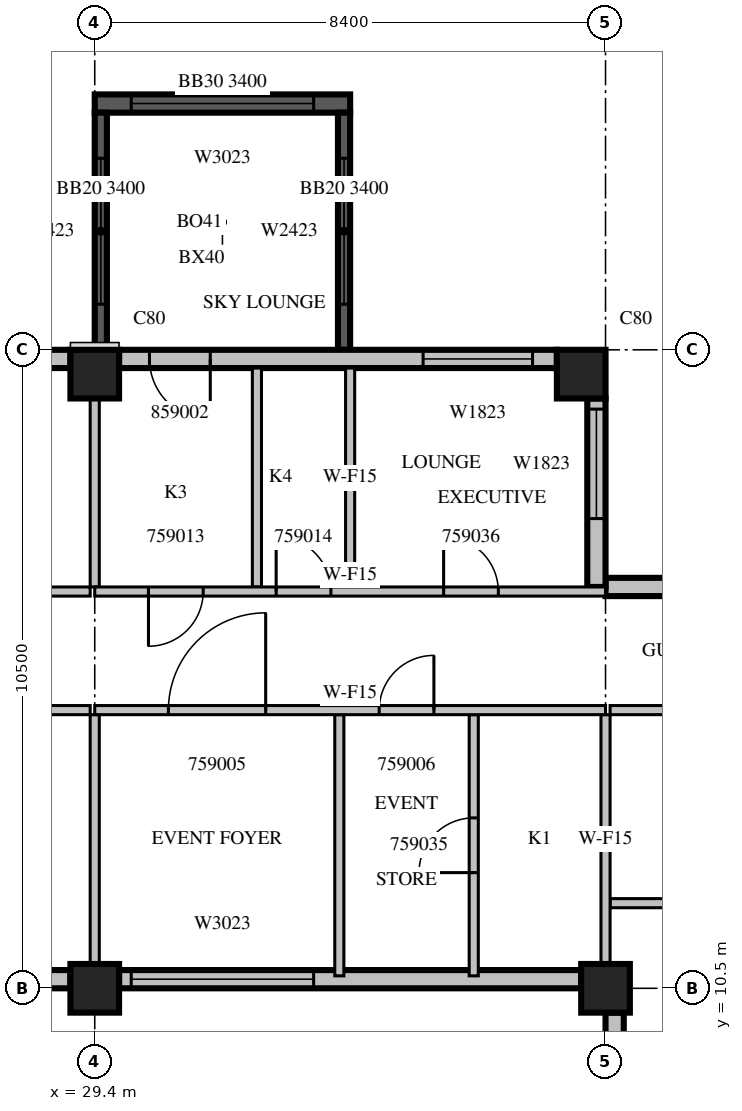
"""IFC4 building model, lengths in metres.
Left out: names, types, materials, properties, quantities, classifications, styles, units other than length and angle.
Written with IfcOpenShell. Run it as: python <this file> out.ifc"""

import sys

from ifc_helpers import new_model, si_unit, direction, frame, frame_2d, origin, origin_2d, place, context, subcontext, project, spatial, rectangle, extrude, source, transform, mapped, element, fill, save


model = new_model("IFC4")
c1 = context("Model", 3, precision=1e-05, world=origin(), true_north=direction((0.0, 1.0)))
c2 = subcontext(c1, "Body", "Model", "MODEL_VIEW")
j1 = project(units=[si_unit("LENGTHUNIT", "METRE"), si_unit("PLANEANGLEUNIT", "RADIAN")], contexts=[c1])
p1 = place(None, origin())
s1 = spatial("IfcSite", under=j1, at=p1, CompositionType="ELEMENT")
p2 = place(p1, origin())
s2 = spatial("IfcBuilding", under=s1, at=p2, CompositionType="ELEMENT")
p3 = place(p2, frame((0.0, 0.0, 257.6)))
s3 = spatial("IfcBuildingStorey", under=s2, at=p3, CompositionType="ELEMENT", Elevation=257.6)
m1 = source(origin(), c2, "Body", "SweptSolid", [
    extrude(rectangle(XDim=0.8, YDim=0.8, at=origin_2d()), origin(), (0.0, 0.0, 1.0), 3.8),
])
for number, where, z_axis, x_axis in (
    (1, (29.4, 10.5, 0.0), (0.0, 0.0, 1.0), (1.0, 0.0, 0.0)),
    (2, (37.8, 10.5, 0.0), (0.0, 0.0, 1.0), (1.0, 0.0, 0.0)),
    (3, (29.4, 20.6, 0.0), (0.0, 0.0, 1.0), (1.0, 0.0, 0.0)),
    (4, (37.4, 20.6, 0.0), (0.0, 0.0, 1.0), (1.0, 0.0, 0.0)),
):
    element("IfcColumn", number, at=place(p3, frame(where, z_axis=z_axis, x_axis=x_axis)), inside=s3, PredefinedType="COLUMN", context=c2, shape_type="MappedRepresentation", body=[
        mapped(m1, transform((0.0, 0.0, 0.0), scale=1.0)),
    ])
m2 = source(origin(), c2, "Body", "SweptSolid", [
    extrude(rectangle(XDim=4.2, YDim=0.3, at=frame_2d((2.1, 0.0))), origin(), (0.0, 0.0, 1.0), 3.4),
])
p4 = place(p3, frame((33.6, 25.05, 0.0), z_axis=(0.0, 0.0, 1.0), x_axis=(-1.0, 0.0, 0.0)))
e5 = element("IfcWall", 5, at=p4, inside=s3, PredefinedType="SOLIDWALL", context=c2, shape_type="MappedRepresentation", body=[
    mapped(m2, transform((0.0, 0.0, 0.0), scale=1.0)),
])
m3 = source(origin(), c2, "Body", "SweptSolid", [
    extrude(rectangle(XDim=3.0, YDim=2.3, at=frame_2d((1.5, 1.15))), frame((0.0, 0.16, 0.0), z_axis=(0.0, -1.0, 0.0), x_axis=(1.0, 0.0, 0.0)), (0.0, 0.0, 1.0), 0.32),
])
p5 = place(p4, frame((0.6, 0.0, 0.6)))
e6 = element("IfcOpeningElement", 6, at=p5, cuts=e5, PredefinedType="OPENING", context=c2, shape_type="MappedRepresentation", body=[
    mapped(m3, transform((0.0, 0.0, 0.0), scale=1.0)),
])
m4 = source(origin(), c2, "Body", "SweptSolid", [
    extrude(rectangle(XDim=3.9, YDim=0.2, at=frame_2d((1.95, 0.0))), origin(), (0.0, 0.0, 1.0), 3.4),
])
p6 = place(p3, frame((33.5, 21.0, 0.0), z_axis=(0.0, 0.0, 1.0), x_axis=(0.0, 1.0, 0.0)))
e7 = element("IfcWall", 7, at=p6, inside=s3, PredefinedType="SOLIDWALL", context=c2, shape_type="MappedRepresentation", body=[
    mapped(m4, transform((0.0, 0.0, 0.0), scale=1.0)),
])
m5 = source(origin(), c2, "Body", "SweptSolid", [
    extrude(rectangle(XDim=2.4, YDim=2.3, at=frame_2d((1.2, 1.15))), frame((0.0, 0.11, 0.0), z_axis=(0.0, -1.0, 0.0), x_axis=(1.0, 0.0, 0.0)), (0.0, 0.0, 1.0), 0.22),
])
p7 = place(p6, frame((0.75, 0.0, 0.6)))
e8 = element("IfcOpeningElement", 8, at=p7, cuts=e7, PredefinedType="OPENING", context=c2, shape_type="MappedRepresentation", body=[
    mapped(m5, transform((0.0, 0.0, 0.0), scale=1.0)),
])
p8 = place(p3, frame((29.5, 21.0, 0.0), z_axis=(0.0, 0.0, 1.0), x_axis=(0.0, 1.0, 0.0)))
e9 = element("IfcWall", 9, at=p8, inside=s3, PredefinedType="SOLIDWALL", context=c2, shape_type="MappedRepresentation", body=[
    mapped(m4, transform((0.0, 0.0, 0.0), scale=1.0)),
])
p9 = place(p8, frame((0.75, 0.0, 0.6)))
e10 = element("IfcOpeningElement", 10, at=p9, cuts=e9, PredefinedType="OPENING", context=c2, shape_type="MappedRepresentation", body=[
    mapped(m5, transform((0.0, 0.0, 0.0), scale=1.0)),
])
m6 = source(origin(), c2, "Body", "SweptSolid", [
    extrude(rectangle(XDim=7.2, YDim=0.3, at=frame_2d((3.6, 0.0))), origin(), (0.0, 0.0, 1.0), 3.4),
])
p10 = place(p3, frame((21.8, 10.65, 0.0), z_axis=(0.0, 0.0, 1.0), x_axis=(1.0, 0.0, 0.0)))
e11 = element("IfcWall", 11, at=p10, inside=s3, PredefinedType="STANDARD", context=c2, shape_type="MappedRepresentation", body=[
    mapped(m6, transform((0.0, 0.0, 0.0), scale=1.0)),
])
m7 = source(origin(), c2, "Body", "SweptSolid", [
    extrude(rectangle(XDim=1.8, YDim=2.3, at=frame_2d((0.9, 1.15))), frame((0.0, 0.16, 0.0), z_axis=(0.0, -1.0, 0.0), x_axis=(1.0, 0.0, 0.0)), (0.0, 0.0, 1.0), 0.32),
])
p11 = place(p10, frame((0.4, 0.0, 0.6)))
e12 = element("IfcOpeningElement", 12, at=p11, cuts=e11, PredefinedType="OPENING", context=c2, shape_type="MappedRepresentation", body=[
    mapped(m7, transform((0.0, 0.0, 0.0), scale=1.0)),
])
p12 = place(p10, frame((4.787, 0.0, 0.6)))
e13 = element("IfcOpeningElement", 13, at=p12, cuts=e11, PredefinedType="OPENING", context=c2, shape_type="MappedRepresentation", body=[
    mapped(m7, transform((0.0, 0.0, 0.0), scale=1.0)),
])
m8 = source(origin(), c2, "Body", "SweptSolid", [
    extrude(rectangle(XDim=7.6, YDim=0.3, at=frame_2d((3.8, 0.0))), origin(), (0.0, 0.0, 1.0), 3.4),
])
p13 = place(p3, frame((29.8, 10.65, 0.0), z_axis=(0.0, 0.0, 1.0), x_axis=(1.0, 0.0, 0.0)))
e14 = element("IfcWall", 14, at=p13, inside=s3, PredefinedType="STANDARD", context=c2, shape_type="MappedRepresentation", body=[
    mapped(m8, transform((0.0, 0.0, 0.0), scale=1.0)),
])
p14 = place(p13, frame((0.2, 0.0, 0.6)))
e15 = element("IfcOpeningElement", 15, at=p14, cuts=e14, PredefinedType="OPENING", context=c2, shape_type="MappedRepresentation", body=[
    mapped(m3, transform((0.0, 0.0, 0.0), scale=1.0)),
])
m9 = source(origin(), c2, "Body", "SweptSolid", [
    extrude(rectangle(XDim=9.3, YDim=0.3, at=frame_2d((4.65, 0.0))), origin(), (0.0, 0.0, 1.0), 3.4),
])
p15 = place(p3, frame((37.95, 10.1, 0.0), z_axis=(0.0, 0.0, 1.0), x_axis=(0.0, -1.0, 0.0)))
e16 = element("IfcWall", 16, at=p15, inside=s3, PredefinedType="STANDARD", context=c2, shape_type="MappedRepresentation", body=[
    mapped(m9, transform((0.0, 0.0, 0.0), scale=1.0)),
])
p16 = place(p15, frame((2.013, 0.0, 0.6)))
e17 = element("IfcOpeningElement", 17, at=p16, cuts=e16, PredefinedType="OPENING", context=c2, shape_type="MappedRepresentation", body=[
    mapped(m7, transform((0.0, 0.0, 0.0), scale=1.0)),
])
p17 = place(p15, frame((5.975, 0.0, 0.6)))
e18 = element("IfcOpeningElement", 18, at=p17, cuts=e16, PredefinedType="OPENING", context=c2, shape_type="MappedRepresentation", body=[
    mapped(m3, transform((0.0, 0.0, 0.0), scale=1.0)),
])
m10 = source(origin(), c2, "Body", "SweptSolid", [
    extrude(rectangle(XDim=15.96, YDim=0.3, at=frame_2d((7.98, 0.0))), origin(), (0.0, 0.0, 1.0), 3.4),
])
p18 = place(p3, frame((53.76, 17.1, 0.0), z_axis=(0.0, 0.0, 1.0), x_axis=(-1.0, 0.0, 0.0)))
e19 = element("IfcWall", 19, at=p18, inside=s3, PredefinedType="STANDARD", context=c2, shape_type="MappedRepresentation", body=[
    mapped(m10, transform((0.0, 0.0, 0.0), scale=1.0)),
])
p19 = place(p18, frame((0.6, 0.0, 0.6)))
e20 = element("IfcOpeningElement", 20, at=p19, cuts=e19, PredefinedType="OPENING", context=c2, shape_type="MappedRepresentation", body=[
    mapped(m3, transform((0.0, 0.0, 0.0), scale=1.0)),
])
p20 = place(p18, frame((4.8, 0.0, 0.6)))
e21 = element("IfcOpeningElement", 21, at=p20, cuts=e19, PredefinedType="OPENING", context=c2, shape_type="MappedRepresentation", body=[
    mapped(m3, transform((0.0, 0.0, 0.0), scale=1.0)),
])
m11 = source(origin(), c2, "Body", "SweptSolid", [
    extrude(rectangle(XDim=3.6, YDim=2.3, at=frame_2d((1.8, 1.15))), frame((0.0, 0.16, 0.0), z_axis=(0.0, -1.0, 0.0), x_axis=(1.0, 0.0, 0.0)), (0.0, 0.0, 1.0), 0.32),
])
p21 = place(p18, frame((9.54, 0.0, 0.6)))
e22 = element("IfcOpeningElement", 22, at=p21, cuts=e19, PredefinedType="OPENING", context=c2, shape_type="MappedRepresentation", body=[
    mapped(m11, transform((0.0, 0.0, 0.0), scale=1.0)),
])
m12 = source(origin(), c2, "Body", "SweptSolid", [
    extrude(rectangle(XDim=3.1, YDim=0.3, at=frame_2d((1.55, 0.0))), origin(), (0.0, 0.0, 1.0), 3.4),
])
p22 = place(p3, frame((37.65, 17.1, 0.0), z_axis=(0.0, 0.0, 1.0), x_axis=(0.0, 1.0, 0.0)))
e23 = element("IfcWall", 23, at=p22, inside=s3, PredefinedType="STANDARD", context=c2, shape_type="MappedRepresentation", body=[
    mapped(m12, transform((0.0, 0.0, 0.0), scale=1.0)),
])
p23 = place(p22, frame((1.125, 0.0, 0.6)))
e24 = element("IfcOpeningElement", 24, at=p23, cuts=e23, PredefinedType="OPENING", context=c2, shape_type="MappedRepresentation", body=[
    mapped(m7, transform((0.0, 0.0, 0.0), scale=1.0)),
])
p24 = place(p3, frame((37.0, 20.85, 0.0), z_axis=(0.0, 0.0, 1.0), x_axis=(-1.0, 0.0, 0.0)))
e25 = element("IfcWall", 25, at=p24, inside=s3, PredefinedType="STANDARD", context=c2, shape_type="MappedRepresentation", body=[
    mapped(m6, transform((0.0, 0.0, 0.0), scale=1.0)),
])
p25 = place(p24, frame((0.4, 0.0, 0.6)))
e26 = element("IfcOpeningElement", 26, at=p25, cuts=e25, PredefinedType="OPENING", context=c2, shape_type="MappedRepresentation", body=[
    mapped(m7, transform((0.0, 0.0, 0.0), scale=1.0)),
])
m13 = source(origin(), c2, "Body", "SweptSolid", [
    extrude(rectangle(XDim=1.0, YDim=2.1, at=frame_2d((0.5, 1.05))), frame((0.0, 0.16, 0.0), z_axis=(0.0, -1.0, 0.0), x_axis=(1.0, 0.0, 0.0)), (0.0, 0.0, 1.0), 0.32),
])
p26 = place(p24, frame((5.7, 0.0, 0.0)))
e27 = element("IfcOpeningElement", 27, at=p26, cuts=e25, PredefinedType="OPENING", context=c2, shape_type="MappedRepresentation", body=[
    mapped(m13, transform((0.0, 0.0, 0.0), scale=1.0)),
])
p27 = place(p3, frame((29.0, 20.85, 0.0), z_axis=(0.0, 0.0, 1.0), x_axis=(-1.0, 0.0, 0.0)))
e28 = element("IfcWall", 28, at=p27, inside=s3, PredefinedType="STANDARD", context=c2, shape_type="MappedRepresentation", body=[
    mapped(m6, transform((0.0, 0.0, 0.0), scale=1.0)),
])
p28 = place(p27, frame((0.613, 0.0, 0.6)))
e29 = element("IfcOpeningElement", 29, at=p28, cuts=e28, PredefinedType="OPENING", context=c2, shape_type="MappedRepresentation", body=[
    mapped(m7, transform((0.0, 0.0, 0.0), scale=1.0)),
])
p29 = place(p27, frame((5.0, 0.0, 0.6)))
e30 = element("IfcOpeningElement", 30, at=p29, cuts=e28, PredefinedType="OPENING", context=c2, shape_type="MappedRepresentation", body=[
    mapped(m7, transform((0.0, 0.0, 0.0), scale=1.0)),
])
m14 = source(origin(), c2, "Body", "SweptSolid", [
    extrude(rectangle(XDim=3.25, YDim=0.15, at=frame_2d((1.625, 0.0))), origin(), (0.0, 0.0, 1.0), 3.4),
])
for number, where, z_axis, x_axis in (
    (31, (29.325, 15.075, 0.0), (0.0, 0.0, 1.0), (-1.0, 0.0, 0.0)),
    (32, (26.075, 17.025, 0.0), (0.0, 0.0, 1.0), (1.0, 0.0, 0.0)),
):
    element("IfcWall", number, at=place(p3, frame(where, z_axis=z_axis, x_axis=x_axis)), inside=s3, PredefinedType="PARTITIONING", context=c2, shape_type="MappedRepresentation", body=[
        mapped(m14, transform((0.0, 0.0, 0.0), scale=1.0)),
    ])
m15 = source(origin(), c2, "Body", "SweptSolid", [
    extrude(rectangle(XDim=4.101, YDim=0.15, at=frame_2d((2.05, 0.0))), origin(), (0.0, 0.0, 1.0), 3.4),
])
p30 = place(p3, frame((29.4, 10.899, 0.0), z_axis=(0.0, 0.0, 1.0), x_axis=(0.0, 1.0, 0.0)))
e33 = element("IfcWall", 33, at=p30, inside=s3, PredefinedType="PARTITIONING", context=c2, shape_type="MappedRepresentation", body=[
    mapped(m15, transform((0.0, 0.0, 0.0), scale=1.0)),
])
m16 = source(origin(), c2, "Body", "SweptSolid", [
    extrude(rectangle(XDim=3.101, YDim=0.15, at=frame_2d((1.55, 0.0))), origin(), (0.0, 0.0, 1.0), 3.4),
])
p31 = place(p3, frame((29.4, 17.1, 0.0), z_axis=(0.0, 0.0, 1.0), x_axis=(0.0, 1.0, 0.0)))
e34 = element("IfcWall", 34, at=p31, inside=s3, PredefinedType="PARTITIONING", context=c2, shape_type="MappedRepresentation", body=[
    mapped(m16, transform((0.0, 0.0, 0.0), scale=1.0)),
])
m17 = source(origin(), c2, "Body", "SweptSolid", [
    extrude(rectangle(XDim=6.45, YDim=0.15, at=frame_2d((3.225, 0.0))), origin(), (0.0, 0.0, 1.0), 3.4),
])
p32 = place(p3, frame((37.875, 11.9, 0.0), z_axis=(0.0, 0.0, 1.0), x_axis=(1.0, 0.0, 0.0)))
e35 = element("IfcWall", 35, at=p32, inside=s3, PredefinedType="PARTITIONING", context=c2, shape_type="MappedRepresentation", body=[
    mapped(m17, transform((0.0, 0.0, 0.0), scale=1.0)),
])
p33 = place(p3, frame((44.325, 15.075, 0.0), z_axis=(0.0, 0.0, 1.0), x_axis=(-1.0, 0.0, 0.0)))
e36 = element("IfcWall", 36, at=p33, inside=s3, PredefinedType="PARTITIONING", context=c2, shape_type="MappedRepresentation", body=[
    mapped(m17, transform((0.0, 0.0, 0.0), scale=1.0)),
])
m18 = source(origin(), c2, "Body", "SweptSolid", [
    extrude(rectangle(XDim=0.9, YDim=2.1, at=frame_2d((0.45, 1.05))), frame((0.0, 0.085, 0.0), z_axis=(0.0, -1.0, 0.0), x_axis=(1.0, 0.0, 0.0)), (0.0, 0.0, 1.0), 0.17),
])
p34 = place(p33, frame((2.812, 0.0, 0.0)))
e37 = element("IfcOpeningElement", 37, at=p34, cuts=e36, PredefinedType="OPENING", context=c2, shape_type="MappedRepresentation", body=[
    mapped(m18, transform((0.0, 0.0, 0.0), scale=1.0)),
])
m19 = source(origin(), c2, "Body", "SweptSolid", [
    extrude(rectangle(XDim=4.295, YDim=0.15, at=frame_2d((2.147, 0.0))), origin(), (0.0, 0.0, 1.0), 3.4),
])
p35 = place(p3, frame((33.422, 10.705, 0.0), z_axis=(0.0, 0.0, 1.0), x_axis=(0.0, 1.0, 0.0)))
e38 = element("IfcWall", 38, at=p35, inside=s3, PredefinedType="PARTITIONING", context=c2, shape_type="MappedRepresentation", body=[
    mapped(m19, transform((0.0, 0.0, 0.0), scale=1.0)),
])
p36 = place(p3, frame((35.633, 10.705, 0.0), z_axis=(0.0, 0.0, 1.0), x_axis=(0.0, 1.0, 0.0)))
e39 = element("IfcWall", 39, at=p36, inside=s3, PredefinedType="PARTITIONING", context=c2, shape_type="MappedRepresentation", body=[
    mapped(m19, transform((0.0, 0.0, 0.0), scale=1.0)),
])
p37 = place(p36, frame((1.698, 0.0, 0.0)))
e40 = element("IfcOpeningElement", 40, at=p37, cuts=e39, PredefinedType="OPENING", context=c2, shape_type="MappedRepresentation", body=[
    mapped(m18, transform((0.0, 0.0, 0.0), scale=1.0)),
])
p38 = place(p3, frame((37.8, 10.899, 0.0), z_axis=(0.0, 0.0, 1.0), x_axis=(0.0, 1.0, 0.0)))
e41 = element("IfcWall", 41, at=p38, inside=s3, PredefinedType="PARTITIONING", context=c2, shape_type="MappedRepresentation", body=[
    mapped(m15, transform((0.0, 0.0, 0.0), scale=1.0)),
])
m20 = source(origin(), c2, "Body", "SweptSolid", [
    extrude(rectangle(XDim=3.6, YDim=0.15, at=frame_2d((1.8, 0.0))), origin(), (0.0, 0.0, 1.0), 3.4),
])
for number, where, z_axis, x_axis in (
    (42, (32.067, 20.7, 0.0), (0.0, 0.0, 1.0), (0.0, -1.0, 0.0)),
    (43, (33.6, 17.1, 0.0), (0.0, 0.0, 1.0), (0.0, 1.0, 0.0)),
):
    element("IfcWall", number, at=place(p3, frame(where, z_axis=z_axis, x_axis=x_axis)), inside=s3, PredefinedType="PARTITIONING", context=c2, shape_type="MappedRepresentation", body=[
        mapped(m20, transform((0.0, 0.0, 0.0), scale=1.0)),
    ])
m21 = source(origin(), c2, "Body", "SweptSolid", [
    extrude(rectangle(XDim=8.4, YDim=0.15, at=frame_2d((4.2, 0.0))), origin(), (0.0, 0.0, 1.0), 3.4),
])
p39 = place(p3, frame((37.8, 15.075, 0.0), z_axis=(0.0, 0.0, 1.0), x_axis=(-1.0, 0.0, 0.0)))
e44 = element("IfcWall", 44, at=p39, inside=s3, PredefinedType="PARTITIONING", context=c2, shape_type="MappedRepresentation", body=[
    mapped(m21, transform((0.0, 0.0, 0.0), scale=1.0)),
])
m22 = source(origin(), c2, "Body", "SweptSolid", [
    extrude(rectangle(XDim=1.6, YDim=2.1, at=frame_2d((0.8, 1.05))), frame((0.0, 0.085, 0.0), z_axis=(0.0, -1.0, 0.0), x_axis=(1.0, 0.0, 0.0)), (0.0, 0.0, 1.0), 0.17),
])
p40 = place(p39, frame((5.589, 0.0, 0.0)))
e45 = element("IfcOpeningElement", 45, at=p40, cuts=e44, PredefinedType="OPENING", context=c2, shape_type="MappedRepresentation", body=[
    mapped(m22, transform((0.0, 0.0, 0.0), scale=1.0)),
])
p41 = place(p39, frame((2.822, 0.0, 0.0)))
e46 = element("IfcOpeningElement", 46, at=p41, cuts=e44, PredefinedType="OPENING", context=c2, shape_type="MappedRepresentation", body=[
    mapped(m18, transform((0.0, 0.0, 0.0), scale=1.0)),
])
p42 = place(p3, frame((29.4, 17.025, 0.0), z_axis=(0.0, 0.0, 1.0), x_axis=(1.0, 0.0, 0.0)))
e47 = element("IfcWall", 47, at=p42, inside=s3, PredefinedType="PARTITIONING", context=c2, shape_type="MappedRepresentation", body=[
    mapped(m21, transform((0.0, 0.0, 0.0), scale=1.0)),
])
p43 = place(p42, frame((0.883, 0.0, 0.0)))
e48 = element("IfcOpeningElement", 48, at=p43, cuts=e47, PredefinedType="OPENING", context=c2, shape_type="MappedRepresentation", body=[
    mapped(m18, transform((0.0, 0.0, 0.0), scale=1.0)),
])
p44 = place(p42, frame((2.983, 0.0, 0.0)))
e49 = element("IfcOpeningElement", 49, at=p44, cuts=e47, PredefinedType="OPENING", context=c2, shape_type="MappedRepresentation", body=[
    mapped(m18, transform((0.0, 0.0, 0.0), scale=1.0)),
])
p45 = place(p42, frame((5.737, 0.0, 0.0)))
e50 = element("IfcOpeningElement", 50, at=p45, cuts=e47, PredefinedType="OPENING", context=c2, shape_type="MappedRepresentation", body=[
    mapped(m18, transform((0.0, 0.0, 0.0), scale=1.0)),
])
m23 = source(origin(), c2, "Body", "SweptSolid", [
    extrude(rectangle(XDim=3.0, YDim=2.3, at=frame_2d((1.5, 1.15))), frame((0.0, 0.03, 0.0), z_axis=(0.0, -1.0, 0.0), x_axis=(1.0, 0.0, 0.0)), (0.0, 0.0, 1.0), 0.06),
])
p46 = place(p5, origin())
e51 = element("IfcWindow", 51, at=p46, inside=s3, PartitioningType="SINGLE_PANEL", PredefinedType="WINDOW", context=c2, shape_type="MappedRepresentation", body=[
    mapped(m23, transform((0.0, 0.0, 0.0), scale=1.0)),
])
fill(e6, e51)
m24 = source(origin(), c2, "Body", "SweptSolid", [
    extrude(rectangle(XDim=2.4, YDim=2.3, at=frame_2d((1.2, 1.15))), frame((0.0, 0.03, 0.0), z_axis=(0.0, -1.0, 0.0), x_axis=(1.0, 0.0, 0.0)), (0.0, 0.0, 1.0), 0.06),
])
p47 = place(p7, origin())
e52 = element("IfcWindow", 52, at=p47, inside=s3, PartitioningType="SINGLE_PANEL", PredefinedType="WINDOW", context=c2, shape_type="MappedRepresentation", body=[
    mapped(m24, transform((0.0, 0.0, 0.0), scale=1.0)),
])
fill(e8, e52)
p48 = place(p9, origin())
e53 = element("IfcWindow", 53, at=p48, inside=s3, PartitioningType="SINGLE_PANEL", PredefinedType="WINDOW", context=c2, shape_type="MappedRepresentation", body=[
    mapped(m24, transform((0.0, 0.0, 0.0), scale=1.0)),
])
fill(e10, e53)
p49 = place(p14, origin())
e54 = element("IfcWindow", 54, at=p49, inside=s3, PartitioningType="SINGLE_PANEL", PredefinedType="WINDOW", context=c2, shape_type="MappedRepresentation", body=[
    mapped(m23, transform((0.0, 0.0, 0.0), scale=1.0)),
])
fill(e15, e54)
m25 = source(origin(), c2, "Body", "SweptSolid", [
    extrude(rectangle(XDim=1.8, YDim=2.3, at=frame_2d((0.9, 1.15))), frame((0.0, 0.03, 0.0), z_axis=(0.0, -1.0, 0.0), x_axis=(1.0, 0.0, 0.0)), (0.0, 0.0, 1.0), 0.06),
])
p50 = place(p23, origin())
e55 = element("IfcWindow", 55, at=p50, inside=s3, PartitioningType="SINGLE_PANEL", PredefinedType="WINDOW", context=c2, shape_type="MappedRepresentation", body=[
    mapped(m25, transform((0.0, 0.0, 0.0), scale=1.0)),
])
fill(e24, e55)
p51 = place(p25, origin())
e56 = element("IfcWindow", 56, at=p51, inside=s3, PartitioningType="SINGLE_PANEL", PredefinedType="WINDOW", context=c2, shape_type="MappedRepresentation", body=[
    mapped(m25, transform((0.0, 0.0, 0.0), scale=1.0)),
])
fill(e26, e56)
m26 = source(origin(), c2, "Body", "SweptSolid", [
    extrude(rectangle(XDim=1.6, YDim=2.1, at=frame_2d((0.8, 1.05))), frame((0.0, 0.025, 0.0), z_axis=(0.0, -1.0, 0.0), x_axis=(1.0, 0.0, 0.0)), (0.0, 0.0, 1.0), 0.05),
])
p52 = place(p40, origin())
e57 = element("IfcDoor", 57, at=p52, inside=s3, OperationType="SINGLE_SWING_RIGHT", PredefinedType="DOOR", context=c2, shape_type="MappedRepresentation", body=[
    mapped(m26, transform((0.0, 0.0, 0.0), scale=1.0)),
])
fill(e45, e57)
m27 = source(origin(), c2, "Body", "SweptSolid", [
    extrude(rectangle(XDim=0.9, YDim=2.1, at=frame_2d((0.45, 1.05))), frame((0.0, 0.025, 0.0), z_axis=(0.0, -1.0, 0.0), x_axis=(1.0, 0.0, 0.0)), (0.0, 0.0, 1.0), 0.05),
])
p53 = place(p41, origin())
e58 = element("IfcDoor", 58, at=p53, inside=s3, OperationType="SINGLE_SWING_RIGHT", PredefinedType="DOOR", context=c2, shape_type="MappedRepresentation", body=[
    mapped(m27, transform((0.0, 0.0, 0.0), scale=1.0)),
])
fill(e46, e58)
p54 = place(p43, origin())
e59 = element("IfcDoor", 59, at=p54, inside=s3, OperationType="SINGLE_SWING_RIGHT", PredefinedType="DOOR", context=c2, shape_type="MappedRepresentation", body=[
    mapped(m27, transform((0.0, 0.0, 0.0), scale=1.0)),
])
fill(e48, e59)
p55 = place(p44, origin())
e60 = element("IfcDoor", 60, at=p55, inside=s3, OperationType="SINGLE_SWING_LEFT", PredefinedType="DOOR", context=c2, shape_type="MappedRepresentation", body=[
    mapped(m27, transform((0.0, 0.0, 0.0), scale=1.0)),
])
fill(e49, e60)
p56 = place(p37, origin())
e61 = element("IfcDoor", 61, at=p56, inside=s3, OperationType="SINGLE_SWING_LEFT", PredefinedType="DOOR", context=c2, shape_type="MappedRepresentation", body=[
    mapped(m27, transform((0.0, 0.0, 0.0), scale=1.0)),
])
fill(e40, e61)
p57 = place(p45, origin())
e62 = element("IfcDoor", 62, at=p57, inside=s3, OperationType="SINGLE_SWING_LEFT", PredefinedType="DOOR", context=c2, shape_type="MappedRepresentation", body=[
    mapped(m27, transform((0.0, 0.0, 0.0), scale=1.0)),
])
fill(e50, e62)
m28 = source(origin(), c2, "Body", "SweptSolid", [
    extrude(rectangle(XDim=1.0, YDim=2.1, at=frame_2d((0.5, 1.05))), frame((0.0, 0.025, 0.0), z_axis=(0.0, -1.0, 0.0), x_axis=(1.0, 0.0, 0.0)), (0.0, 0.0, 1.0), 0.05),
])
p58 = place(p26, origin())
e63 = element("IfcDoor", 63, at=p58, inside=s3, OperationType="SINGLE_SWING_LEFT", PredefinedType="DOOR", context=c2, shape_type="MappedRepresentation", body=[
    mapped(m28, transform((0.0, 0.0, 0.0), scale=1.0)),
])
fill(e27, e63)
save(model, sys.argv[1])
